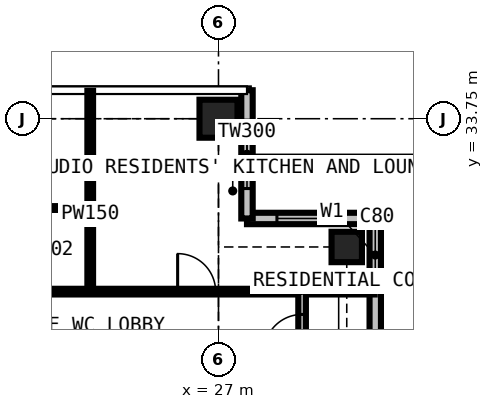
"""IFC4 building model, lengths in metres.
Left out: names, types, materials, properties, quantities, classifications, styles, units other than length and angle.
Written with IfcOpenShell. Run it as: python <this file> out.ifc"""

import sys

from ifc_helpers import new_model, si_unit, direction, frame, frame_2d, origin, origin_2d, place, context, subcontext, project, spatial, rectangle, extrude, element, fill, save


model = new_model("IFC4")
c1 = context("Model", 3, precision=1e-05, world=origin(), true_north=direction((0.0, 1.0)))
c2 = subcontext(c1, "Body", "Model", "MODEL_VIEW")
j1 = project(units=[si_unit("LENGTHUNIT", "METRE"), si_unit("PLANEANGLEUNIT", "RADIAN")], contexts=[c1])
p1 = place(None, origin())
s1 = spatial("IfcSite", under=j1, at=p1, CompositionType="ELEMENT")
p2 = place(p1, origin())
s2 = spatial("IfcBuilding", under=s1, at=p2, CompositionType="ELEMENT")
p3 = place(p2, frame((0.0, 0.0, 243.9)))
s3 = spatial("IfcBuildingStorey", under=s2, at=p3, CompositionType="ELEMENT", Elevation=243.9)
p4 = place(p3, frame((27.0, 33.75, 0.0), z_axis=(0.0, 0.0, 1.0), x_axis=(1.0, 0.0, 0.0)))
e1 = element("IfcColumn", 1, at=p4, inside=s3, PredefinedType="COLUMN", context=c2, shape_type="SweptSolid", body=[
    extrude(rectangle(XDim=1.0, YDim=1.0, at=origin_2d()), origin(), (0.0, 0.0, 1.0), 3.6),
])
p5 = place(p3, frame((30.375, 30.375, 0.0), z_axis=(0.0, 0.0, 1.0), x_axis=(1.0, 0.0, 0.0)))
e2 = element("IfcColumn", 2, at=p5, inside=s3, PredefinedType="COLUMN", context=c2, shape_type="SweptSolid", body=[
    extrude(rectangle(XDim=0.8, YDim=0.8, at=origin_2d()), origin(), (0.0, 0.0, 1.0), 3.6),
])
p6 = place(p3, frame((31.125, 27.75, 0.0), z_axis=(0.0, 0.0, 1.0), x_axis=(0.0, 1.0, 0.0)))
e3 = element("IfcWall", 3, at=p6, inside=s3, PredefinedType="SOLIDWALL", context=c2, shape_type="SweptSolid", body=[
    extrude(rectangle(XDim=3.375, YDim=0.3, at=frame_2d((1.688, 0.0))), origin(), (0.0, 0.0, 1.0), 3.375),
])
p7 = place(p6, frame((1.663, 0.0, 0.9)))
e4 = element("IfcOpeningElement", 4, at=p7, cuts=e3, PredefinedType="OPENING", context=c2, shape_type="SweptSolid", body=[
    extrude(rectangle(XDim=1.5, YDim=1.8, at=frame_2d((0.75, 0.9))), frame((0.0, 0.16, 0.0), z_axis=(0.0, -1.0, 0.0), x_axis=(1.0, 0.0, 0.0)), (0.0, 0.0, 1.0), 0.32),
])
p8 = place(p3, frame((31.125, 31.125, 0.0), z_axis=(0.0, 0.0, 1.0), x_axis=(-1.0, 0.0, 0.0)))
e5 = element("IfcWall", 5, at=p8, inside=s3, PredefinedType="SOLIDWALL", context=c2, shape_type="SweptSolid", body=[
    extrude(rectangle(XDim=3.375, YDim=0.3, at=frame_2d((1.688, 0.0))), origin(), (0.0, 0.0, 1.0), 3.375),
])
p9 = place(p8, frame((0.788, 0.0, 0.6)))
e6 = element("IfcOpeningElement", 6, at=p9, cuts=e5, PredefinedType="OPENING", context=c2, shape_type="SweptSolid", body=[
    extrude(rectangle(XDim=1.8, YDim=2.1, at=frame_2d((0.9, 1.05))), frame((0.0, 0.16, 0.0), z_axis=(0.0, -1.0, 0.0), x_axis=(1.0, 0.0, 0.0)), (0.0, 0.0, 1.0), 0.32),
])
p10 = place(p3, frame((27.75, 31.125, 0.0), z_axis=(0.0, 0.0, 1.0), x_axis=(0.0, 1.0, 0.0)))
e7 = element("IfcWall", 7, at=p10, inside=s3, PredefinedType="SOLIDWALL", context=c2, shape_type="SweptSolid", body=[
    extrude(rectangle(XDim=3.375, YDim=0.3, at=frame_2d((1.688, 0.0))), origin(), (0.0, 0.0, 1.0), 3.375),
])
p11 = place(p10, frame((0.788, 0.0, 0.6)))
e8 = element("IfcOpeningElement", 8, at=p11, cuts=e7, PredefinedType="OPENING", context=c2, shape_type="SweptSolid", body=[
    extrude(rectangle(XDim=1.8, YDim=2.1, at=frame_2d((0.9, 1.05))), frame((0.0, 0.16, 0.0), z_axis=(0.0, -1.0, 0.0), x_axis=(1.0, 0.0, 0.0)), (0.0, 0.0, 1.0), 0.32),
])
p12 = place(p3, frame((11.3, 29.2, 0.0), z_axis=(0.0, 0.0, 1.0), x_axis=(1.0, 0.0, 0.0)))
e9 = element("IfcWall", 9, at=p12, inside=s3, PredefinedType="PARTITIONING", context=c2, shape_type="SweptSolid", body=[
    extrude(rectangle(XDim=19.809, YDim=0.15, at=frame_2d((9.904, 0.0))), origin(), (0.0, 0.0, 1.0), 3.375),
])
p13 = place(p12, frame((14.625, 0.0, 0.0)))
e10 = element("IfcOpeningElement", 10, at=p13, cuts=e9, PredefinedType="OPENING", context=c2, shape_type="SweptSolid", body=[
    extrude(rectangle(XDim=1.0, YDim=2.2, at=frame_2d((0.5, 1.1))), frame((0.0, 0.085, 0.0), z_axis=(0.0, -1.0, 0.0), x_axis=(1.0, 0.0, 0.0)), (0.0, 0.0, 1.0), 0.17),
])
p14 = place(p12, frame((6.4, 0.0, 0.0)))
e11 = element("IfcOpeningElement", 11, at=p14, cuts=e9, PredefinedType="OPENING", context=c2, shape_type="SweptSolid", body=[
    extrude(rectangle(XDim=0.95, YDim=2.2, at=frame_2d((0.475, 1.1))), frame((0.0, 0.085, 0.0), z_axis=(0.0, -1.0, 0.0), x_axis=(1.0, 0.0, 0.0)), (0.0, 0.0, 1.0), 0.17),
])
p15 = place(p12, frame((9.2, 0.0, 0.0)))
e12 = element("IfcOpeningElement", 12, at=p15, cuts=e9, PredefinedType="OPENING", context=c2, shape_type="SweptSolid", body=[
    extrude(rectangle(XDim=0.95, YDim=2.2, at=frame_2d((0.475, 1.1))), frame((0.0, 0.085, 0.0), z_axis=(0.0, -1.0, 0.0), x_axis=(1.0, 0.0, 0.0)), (0.0, 0.0, 1.0), 0.17),
])
p16 = place(p12, frame((0.6, 0.0, 0.0)))
e13 = element("IfcOpeningElement", 13, at=p16, cuts=e9, PredefinedType="OPENING", context=c2, shape_type="SweptSolid", body=[
    extrude(rectangle(XDim=1.0, YDim=2.2, at=frame_2d((0.5, 1.1))), frame((0.0, 0.085, 0.0), z_axis=(0.0, -1.0, 0.0), x_axis=(1.0, 0.0, 0.0)), (0.0, 0.0, 1.0), 0.17),
])
p17 = place(p3, frame((21.625, 31.4, 0.0), z_axis=(0.0, 0.0, 1.0), x_axis=(1.0, 0.0, 0.0)))
e14 = element("IfcWall", 14, at=p17, inside=s3, PredefinedType="PARTITIONING", context=c2, shape_type="SweptSolid", body=[
    extrude(rectangle(XDim=2.0, YDim=0.1, at=frame_2d((1.0, 0.0))), origin(), (0.0, 0.0, 1.0), 3.375),
])
p18 = place(p3, frame((23.625, 29.2, 0.0), z_axis=(0.0, 0.0, 1.0), x_axis=(0.0, 1.0, 0.0)))
e15 = element("IfcWall", 15, at=p18, inside=s3, PredefinedType="PARTITIONING", context=c2, shape_type="SweptSolid", body=[
    extrude(rectangle(XDim=5.284, YDim=0.15, at=frame_2d((2.642, 0.0))), origin(), (0.0, 0.0, 1.0), 3.375),
])
p19 = place(p3, frame((29.2, 11.3, 0.0), z_axis=(0.0, 0.0, 1.0), x_axis=(0.0, 1.0, 0.0)))
e16 = element("IfcWall", 16, at=p19, inside=s3, PredefinedType="PARTITIONING", context=c2, shape_type="SweptSolid", body=[
    extrude(rectangle(XDim=17.9, YDim=0.2, at=frame_2d((8.95, 0.0))), origin(), (0.0, 0.0, 1.0), 3.375),
])
p20 = place(p19, frame((0.6, 0.0, 0.0)))
e17 = element("IfcOpeningElement", 17, at=p20, cuts=e16, PredefinedType="OPENING", context=c2, shape_type="SweptSolid", body=[
    extrude(rectangle(XDim=1.0, YDim=2.2, at=frame_2d((0.5, 1.1))), frame((0.0, 0.11, 0.0), z_axis=(0.0, -1.0, 0.0), x_axis=(1.0, 0.0, 0.0)), (0.0, 0.0, 1.0), 0.22),
])
p21 = place(p19, frame((2.4, 0.0, 0.0)))
e18 = element("IfcOpeningElement", 18, at=p21, cuts=e16, PredefinedType="OPENING", context=c2, shape_type="SweptSolid", body=[
    extrude(rectangle(XDim=0.95, YDim=2.2, at=frame_2d((0.475, 1.1))), frame((0.0, 0.11, 0.0), z_axis=(0.0, -1.0, 0.0), x_axis=(1.0, 0.0, 0.0)), (0.0, 0.0, 1.0), 0.22),
])
p22 = place(p19, frame((5.825, 0.0, 0.0)))
e19 = element("IfcOpeningElement", 19, at=p22, cuts=e16, PredefinedType="OPENING", context=c2, shape_type="SweptSolid", body=[
    extrude(rectangle(XDim=0.95, YDim=2.2, at=frame_2d((0.475, 1.1))), frame((0.0, 0.11, 0.0), z_axis=(0.0, -1.0, 0.0), x_axis=(1.0, 0.0, 0.0)), (0.0, 0.0, 1.0), 0.22),
])
p23 = place(p19, frame((9.2, 0.0, 0.0)))
e20 = element("IfcOpeningElement", 20, at=p23, cuts=e16, PredefinedType="OPENING", context=c2, shape_type="SweptSolid", body=[
    extrude(rectangle(XDim=0.95, YDim=2.2, at=frame_2d((0.475, 1.1))), frame((0.0, 0.11, 0.0), z_axis=(0.0, -1.0, 0.0), x_axis=(1.0, 0.0, 0.0)), (0.0, 0.0, 1.0), 0.22),
])
p24 = place(p19, frame((12.575, 0.0, 0.0)))
e21 = element("IfcOpeningElement", 21, at=p24, cuts=e16, PredefinedType="OPENING", context=c2, shape_type="SweptSolid", body=[
    extrude(rectangle(XDim=0.95, YDim=2.2, at=frame_2d((0.475, 1.1))), frame((0.0, 0.11, 0.0), z_axis=(0.0, -1.0, 0.0), x_axis=(1.0, 0.0, 0.0)), (0.0, 0.0, 1.0), 0.22),
])
p25 = place(p19, frame((16.3, 0.0, 0.0)))
e22 = element("IfcOpeningElement", 22, at=p25, cuts=e16, PredefinedType="OPENING", context=c2, shape_type="SweptSolid", body=[
    extrude(rectangle(XDim=1.0, YDim=2.2, at=frame_2d((0.5, 1.1))), frame((0.0, 0.11, 0.0), z_axis=(0.0, -1.0, 0.0), x_axis=(1.0, 0.0, 0.0)), (0.0, 0.0, 1.0), 0.22),
])
p26 = place(p7, origin())
e23 = element("IfcWindow", 23, at=p26, inside=s3, PartitioningType="SINGLE_PANEL", PredefinedType="WINDOW", context=c2, shape_type="SweptSolid", body=[
    extrude(rectangle(XDim=1.5, YDim=1.8, at=frame_2d((0.75, 0.9))), frame((0.0, 0.03, 0.0), z_axis=(0.0, -1.0, 0.0), x_axis=(1.0, 0.0, 0.0)), (0.0, 0.0, 1.0), 0.06),
])
fill(e4, e23)
p27 = place(p9, origin())
e24 = element("IfcWindow", 24, at=p27, inside=s3, PartitioningType="SINGLE_PANEL", PredefinedType="WINDOW", context=c2, shape_type="SweptSolid", body=[
    extrude(rectangle(XDim=1.8, YDim=2.1, at=frame_2d((0.9, 1.05))), frame((0.0, 0.03, 0.0), z_axis=(0.0, -1.0, 0.0), x_axis=(1.0, 0.0, 0.0)), (0.0, 0.0, 1.0), 0.06),
])
fill(e6, e24)
p28 = place(p11, origin())
e25 = element("IfcWindow", 25, at=p28, inside=s3, PartitioningType="SINGLE_PANEL", PredefinedType="WINDOW", context=c2, shape_type="SweptSolid", body=[
    extrude(rectangle(XDim=1.8, YDim=2.1, at=frame_2d((0.9, 1.05))), frame((0.0, 0.03, 0.0), z_axis=(0.0, -1.0, 0.0), x_axis=(1.0, 0.0, 0.0)), (0.0, 0.0, 1.0), 0.06),
])
fill(e8, e25)
p29 = place(p25, origin())
e26 = element("IfcDoor", 26, at=p29, inside=s3, OperationType="SINGLE_SWING_LEFT", PredefinedType="DOOR", context=c2, shape_type="SweptSolid", body=[
    extrude(rectangle(XDim=1.0, YDim=2.2, at=frame_2d((0.5, 1.1))), frame((0.0, 0.025, 0.0), z_axis=(0.0, -1.0, 0.0), x_axis=(1.0, 0.0, 0.0)), (0.0, 0.0, 1.0), 0.05),
])
fill(e22, e26)
p30 = place(p13, origin())
e27 = element("IfcDoor", 27, at=p30, inside=s3, OperationType="SINGLE_SWING_LEFT", PredefinedType="DOOR", context=c2, shape_type="SweptSolid", body=[
    extrude(rectangle(XDim=1.0, YDim=2.2, at=frame_2d((0.5, 1.1))), frame((0.0, 0.025, 0.0), z_axis=(0.0, -1.0, 0.0), x_axis=(1.0, 0.0, 0.0)), (0.0, 0.0, 1.0), 0.05),
])
fill(e10, e27)
save(model, sys.argv[1])
